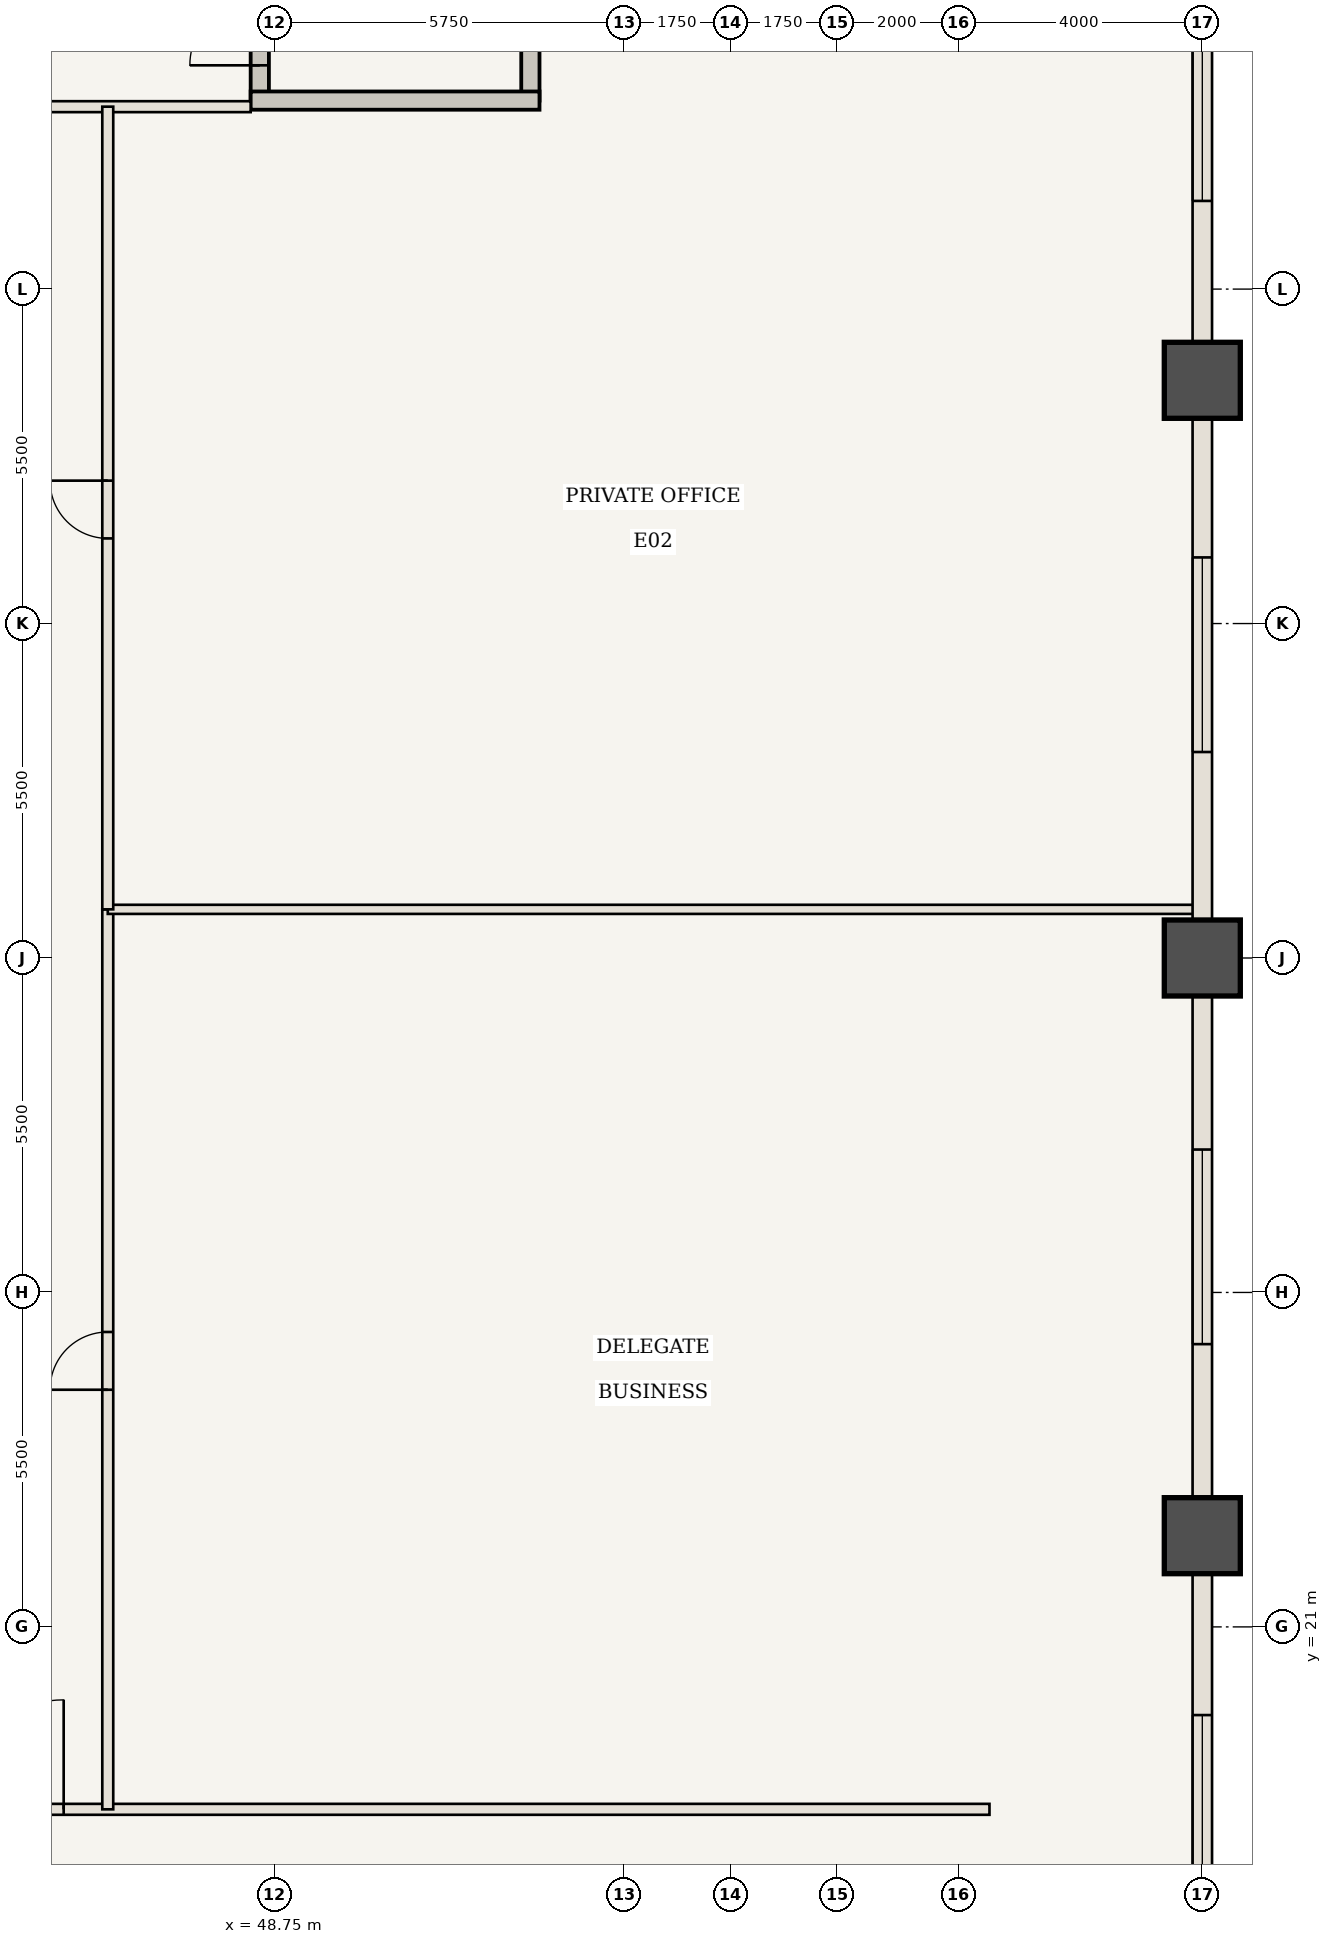
"""IFC4 building model, lengths in metres.
Left out: names, types, materials, properties, quantities, classifications, styles, units other than length and angle.
Written with IfcOpenShell. Run it as: python <this file> out.ifc"""

import sys

from ifc_helpers import new_model, si_unit, direction, frame, frame_2d, origin, origin_2d, place, context, subcontext, project, spatial, rectangle, extrude, element, fill, save


model = new_model("IFC4")
c1 = context("Model", 3, precision=1e-05, world=origin(), true_north=direction((0.0, 1.0)))
c2 = subcontext(c1, "Body", "Model", "MODEL_VIEW")
j1 = project(units=[si_unit("LENGTHUNIT", "METRE"), si_unit("PLANEANGLEUNIT", "RADIAN")], contexts=[c1])
p1 = place(None, origin())
s1 = spatial("IfcSite", under=j1, at=p1, CompositionType="ELEMENT")
p2 = place(p1, origin())
s2 = spatial("IfcBuilding", under=s1, at=p2, CompositionType="ELEMENT")
p3 = place(p2, frame((0.0, 0.0, 29.4)))
s3 = spatial("IfcBuildingStorey", under=s2, at=p3, CompositionType="ELEMENT", Elevation=29.4)
for number, where, z_axis, x_axis in (
    (1, (64.0, 22.5, 0.0), (0.0, 0.0, 1.0), (1.0, 0.0, 0.0)),
    (2, (64.0, 32.0, 0.0), (0.0, 0.0, 1.0), (1.0, 0.0, 0.0)),
    (3, (64.0, 41.5, 0.0), (0.0, 0.0, 1.0), (1.0, 0.0, 0.0)),
):
    element("IfcColumn", number, at=place(p3, frame(where, z_axis=z_axis, x_axis=x_axis)), inside=s3, PredefinedType="COLUMN", context=c2, shape_type="SweptSolid", body=[
        extrude(rectangle(XDim=1.25, YDim=1.25, at=origin_2d()), origin(), (0.0, 0.0, 1.0), 4.48),
    ])
p4 = place(p3, frame((48.5, 46.1, 0.0), z_axis=(0.0, 0.0, 1.0), x_axis=(0.0, 1.0, 0.0)))
e4 = element("IfcWall", 4, at=p4, inside=s3, PredefinedType="SHEAR", context=c2, shape_type="SweptSolid", body=[
    extrude(rectangle(XDim=10.5, YDim=0.3, at=frame_2d((5.25, 0.0))), origin(), (0.0, 0.0, 1.0), 4.48),
])
p5 = place(p4, frame((0.58, 0.0, 0.0)))
e5 = element("IfcOpeningElement", 5, at=p5, cuts=e4, PredefinedType="OPENING", context=c2, shape_type="SweptSolid", body=[
    extrude(rectangle(XDim=1.15, YDim=2.15, at=frame_2d((0.575, 1.075))), frame((0.0, 0.16, 0.0), z_axis=(0.0, -1.0, 0.0), x_axis=(1.0, 0.0, 0.0)), (0.0, 0.0, 1.0), 0.32),
])
p6 = place(p3, frame((52.95, 46.1, 0.0), z_axis=(0.0, 0.0, 1.0), x_axis=(0.0, 1.0, 0.0)))
e6 = element("IfcWall", 6, at=p6, inside=s3, PredefinedType="SHEAR", context=c2, shape_type="SweptSolid", body=[
    extrude(rectangle(XDim=10.5, YDim=0.3, at=frame_2d((5.25, 0.0))), origin(), (0.0, 0.0, 1.0), 4.48),
])
p7 = place(p3, frame((48.35, 46.1, 0.0), z_axis=(0.0, 0.0, 1.0), x_axis=(1.0, 0.0, 0.0)))
e7 = element("IfcWall", 7, at=p7, inside=s3, PredefinedType="SHEAR", context=c2, shape_type="SweptSolid", body=[
    extrude(rectangle(XDim=4.75, YDim=0.3, at=frame_2d((2.375, 0.0))), origin(), (0.0, 0.0, 1.0), 4.48),
])
p8 = place(p3, frame((42.0, 18.0, 0.0), z_axis=(0.0, 0.0, 1.0), x_axis=(1.0, 0.0, 0.0)))
e8 = element("IfcWall", 8, at=p8, inside=s3, PredefinedType="STANDARD", context=c2, shape_type="SweptSolid", body=[
    extrude(rectangle(XDim=18.5, YDim=0.18, at=frame_2d((9.25, 0.0))), origin(), (0.0, 0.0, 1.0), 4.48),
])
p9 = place(p8, frame((1.475, 0.0, 0.0)))
e9 = element("IfcOpeningElement", 9, at=p9, cuts=e8, PredefinedType="OPENING", context=c2, shape_type="SweptSolid", body=[
    extrude(rectangle(XDim=1.8, YDim=2.35, at=frame_2d((0.9, 1.175))), frame((0.0, 0.1, 0.0), z_axis=(0.0, -1.0, 0.0), x_axis=(1.0, 0.0, 0.0)), (0.0, 0.0, 1.0), 0.2),
])
p10 = place(p3, frame((34.5, 46.0, 0.0), z_axis=(0.0, 0.0, 1.0), x_axis=(1.0, 0.0, 0.0)))
e10 = element("IfcWall", 10, at=p10, inside=s3, PredefinedType="STANDARD", context=c2, shape_type="SweptSolid", body=[
    extrude(rectangle(XDim=13.85, YDim=0.18, at=frame_2d((6.925, 0.0))), origin(), (0.0, 0.0, 1.0), 4.48),
])
p11 = place(p10, frame((5.225, 0.0, 0.0)))
e11 = element("IfcOpeningElement", 11, at=p11, cuts=e10, PredefinedType="OPENING", context=c2, shape_type="SweptSolid", body=[
    extrude(rectangle(XDim=0.95, YDim=2.15, at=frame_2d((0.475, 1.075))), frame((0.0, 0.1, 0.0), z_axis=(0.0, -1.0, 0.0), x_axis=(1.0, 0.0, 0.0)), (0.0, 0.0, 1.0), 0.2),
])
p12 = place(p3, frame((46.0, 18.0, 0.0), z_axis=(0.0, 0.0, 1.0), x_axis=(0.0, 1.0, 0.0)))
e12 = element("IfcWall", 12, at=p12, inside=s3, PredefinedType="STANDARD", context=c2, shape_type="SweptSolid", body=[
    extrude(rectangle(XDim=14.8, YDim=0.18, at=frame_2d((7.4, 0.0))), origin(), (0.0, 0.0, 1.0), 4.48),
])
p13 = place(p12, frame((6.9, 0.0, 0.0)))
e13 = element("IfcOpeningElement", 13, at=p13, cuts=e12, PredefinedType="OPENING", context=c2, shape_type="SweptSolid", body=[
    extrude(rectangle(XDim=0.95, YDim=2.15, at=frame_2d((0.475, 1.075))), frame((0.0, 0.1, 0.0), z_axis=(0.0, -1.0, 0.0), x_axis=(1.0, 0.0, 0.0)), (0.0, 0.0, 1.0), 0.2),
])
p14 = place(p3, frame((46.0, 32.8, 0.0), z_axis=(0.0, 0.0, 1.0), x_axis=(1.0, 0.0, 0.0)))
e14 = element("IfcWall", 14, at=p14, inside=s3, PredefinedType="STANDARD", context=c2, shape_type="SweptSolid", body=[
    extrude(rectangle(XDim=17.94, YDim=0.15, at=frame_2d((8.97, 0.0))), origin(), (0.0, 0.0, 1.0), 2.508),
])
p15 = place(p3, frame((46.0, 32.8, 0.0), z_axis=(0.0, 0.0, 1.0), x_axis=(0.0, 1.0, 0.0)))
e15 = element("IfcWall", 15, at=p15, inside=s3, PredefinedType="STANDARD", context=c2, shape_type="SweptSolid", body=[
    extrude(rectangle(XDim=13.2, YDim=0.18, at=frame_2d((6.6, 0.0))), origin(), (0.0, 0.0, 1.0), 4.48),
])
p16 = place(p15, frame((6.1, 0.0, 0.0)))
e16 = element("IfcOpeningElement", 16, at=p16, cuts=e15, PredefinedType="OPENING", context=c2, shape_type="SweptSolid", body=[
    extrude(rectangle(XDim=0.95, YDim=2.15, at=frame_2d((0.475, 1.075))), frame((0.0, 0.1, 0.0), z_axis=(0.0, -1.0, 0.0), x_axis=(1.0, 0.0, 0.0)), (0.0, 0.0, 1.0), 0.2),
])
p17 = place(p3, frame((64.0, 22.5, 0.0), z_axis=(0.0, 0.0, 1.0), x_axis=(0.0, -1.0, 0.0)))
e17 = element("IfcWall", 17, at=p17, inside=s3, PredefinedType="USERDEFINED", context=c2, shape_type="SweptSolid", body=[
    extrude(rectangle(XDim=9.5, YDim=0.32, at=frame_2d((4.75, 0.0))), origin(), (0.0, 0.0, 1.0), 2.48),
])
p18 = place(p17, frame((2.95, 0.0, 0.85)))
e18 = element("IfcOpeningElement", 18, at=p18, cuts=e17, PredefinedType="OPENING", context=c2, shape_type="SweptSolid", body=[
    extrude(rectangle(XDim=3.6, YDim=1.43, at=frame_2d((1.8, 0.715))), frame((0.0, 0.17, 0.0), z_axis=(0.0, -1.0, 0.0), x_axis=(1.0, 0.0, 0.0)), (0.0, 0.0, 1.0), 0.34),
])
p19 = place(p3, frame((64.0, 32.0, 0.0), z_axis=(0.0, 0.0, 1.0), x_axis=(0.0, -1.0, 0.0)))
e19 = element("IfcWall", 19, at=p19, inside=s3, PredefinedType="USERDEFINED", context=c2, shape_type="SweptSolid", body=[
    extrude(rectangle(XDim=9.5, YDim=0.32, at=frame_2d((4.75, 0.0))), origin(), (0.0, 0.0, 1.0), 2.48),
])
p20 = place(p19, frame((3.15, 0.0, 0.85)))
e20 = element("IfcOpeningElement", 20, at=p20, cuts=e19, PredefinedType="OPENING", context=c2, shape_type="SweptSolid", body=[
    extrude(rectangle(XDim=3.2, YDim=1.43, at=frame_2d((1.6, 0.715))), frame((0.0, 0.17, 0.0), z_axis=(0.0, -1.0, 0.0), x_axis=(1.0, 0.0, 0.0)), (0.0, 0.0, 1.0), 0.34),
])
p21 = place(p3, frame((64.0, 41.5, 0.0), z_axis=(0.0, 0.0, 1.0), x_axis=(0.0, -1.0, 0.0)))
e21 = element("IfcWall", 21, at=p21, inside=s3, PredefinedType="USERDEFINED", context=c2, shape_type="SweptSolid", body=[
    extrude(rectangle(XDim=9.5, YDim=0.32, at=frame_2d((4.75, 0.0))), origin(), (0.0, 0.0, 1.0), 2.48),
])
p22 = place(p21, frame((2.913, 0.0, 0.85)))
e22 = element("IfcOpeningElement", 22, at=p22, cuts=e21, PredefinedType="OPENING", context=c2, shape_type="SweptSolid", body=[
    extrude(rectangle(XDim=3.2, YDim=1.43, at=frame_2d((1.6, 0.715))), frame((0.0, 0.17, 0.0), z_axis=(0.0, -1.0, 0.0), x_axis=(1.0, 0.0, 0.0)), (0.0, 0.0, 1.0), 0.34),
])
p23 = place(p3, frame((64.0, 51.0, 0.0), z_axis=(0.0, 0.0, 1.0), x_axis=(0.0, -1.0, 0.0)))
e23 = element("IfcWall", 23, at=p23, inside=s3, PredefinedType="USERDEFINED", context=c2, shape_type="SweptSolid", body=[
    extrude(rectangle(XDim=9.5, YDim=0.32, at=frame_2d((4.75, 0.0))), origin(), (0.0, 0.0, 1.0), 2.48),
])
p24 = place(p23, frame((2.95, 0.0, 0.85)))
e24 = element("IfcOpeningElement", 24, at=p24, cuts=e23, PredefinedType="OPENING", context=c2, shape_type="SweptSolid", body=[
    extrude(rectangle(XDim=3.6, YDim=1.43, at=frame_2d((1.8, 0.715))), frame((0.0, 0.17, 0.0), z_axis=(0.0, -1.0, 0.0), x_axis=(1.0, 0.0, 0.0)), (0.0, 0.0, 1.0), 0.34),
])
p25 = place(p5, origin())
e25 = element("IfcDoor", 25, at=p25, inside=s3, OperationType="SINGLE_SWING_LEFT", PredefinedType="DOOR", context=c2, shape_type="SweptSolid", body=[
    extrude(rectangle(XDim=1.15, YDim=2.15, at=frame_2d((0.575, 1.075))), frame((0.0, 0.025, 0.0), z_axis=(0.0, -1.0, 0.0), x_axis=(1.0, 0.0, 0.0)), (0.0, 0.0, 1.0), 0.05),
])
fill(e5, e25)
p26 = place(p9, origin())
e26 = element("IfcDoor", 26, at=p26, inside=s3, OperationType="SINGLE_SWING_RIGHT", PredefinedType="DOOR", context=c2, shape_type="SweptSolid", body=[
    extrude(rectangle(XDim=1.8, YDim=2.35, at=frame_2d((0.9, 1.175))), frame((0.0, 0.025, 0.0), z_axis=(0.0, -1.0, 0.0), x_axis=(1.0, 0.0, 0.0)), (0.0, 0.0, 1.0), 0.05),
])
fill(e9, e26)
p27 = place(p13, origin())
e27 = element("IfcDoor", 27, at=p27, inside=s3, OperationType="SINGLE_SWING_LEFT", PredefinedType="DOOR", context=c2, shape_type="SweptSolid", body=[
    extrude(rectangle(XDim=0.95, YDim=2.15, at=frame_2d((0.475, 1.075))), frame((0.0, 0.025, 0.0), z_axis=(0.0, -1.0, 0.0), x_axis=(1.0, 0.0, 0.0)), (0.0, 0.0, 1.0), 0.05),
])
fill(e13, e27)
p28 = place(p16, origin())
e28 = element("IfcDoor", 28, at=p28, inside=s3, OperationType="SINGLE_SWING_RIGHT", PredefinedType="DOOR", context=c2, shape_type="SweptSolid", body=[
    extrude(rectangle(XDim=0.95, YDim=2.15, at=frame_2d((0.475, 1.075))), frame((0.0, 0.025, 0.0), z_axis=(0.0, -1.0, 0.0), x_axis=(1.0, 0.0, 0.0)), (0.0, 0.0, 1.0), 0.05),
])
fill(e16, e28)
p29 = place(p18, origin())
e29 = element("IfcWindow", 29, at=p29, inside=s3, PartitioningType="SINGLE_PANEL", PredefinedType="WINDOW", context=c2, shape_type="SweptSolid", body=[
    extrude(rectangle(XDim=3.6, YDim=1.43, at=frame_2d((1.8, 0.715))), frame((0.0, 0.03, 0.0), z_axis=(0.0, -1.0, 0.0), x_axis=(1.0, 0.0, 0.0)), (0.0, 0.0, 1.0), 0.06),
])
fill(e18, e29)
p30 = place(p20, origin())
e30 = element("IfcWindow", 30, at=p30, inside=s3, PartitioningType="SINGLE_PANEL", PredefinedType="WINDOW", context=c2, shape_type="SweptSolid", body=[
    extrude(rectangle(XDim=3.2, YDim=1.43, at=frame_2d((1.6, 0.715))), frame((0.0, 0.03, 0.0), z_axis=(0.0, -1.0, 0.0), x_axis=(1.0, 0.0, 0.0)), (0.0, 0.0, 1.0), 0.06),
])
fill(e20, e30)
p31 = place(p22, origin())
e31 = element("IfcWindow", 31, at=p31, inside=s3, PartitioningType="SINGLE_PANEL", PredefinedType="WINDOW", context=c2, shape_type="SweptSolid", body=[
    extrude(rectangle(XDim=3.2, YDim=1.43, at=frame_2d((1.6, 0.715))), frame((0.0, 0.03, 0.0), z_axis=(0.0, -1.0, 0.0), x_axis=(1.0, 0.0, 0.0)), (0.0, 0.0, 1.0), 0.06),
])
fill(e22, e31)
p32 = place(p24, origin())
e32 = element("IfcWindow", 32, at=p32, inside=s3, PartitioningType="SINGLE_PANEL", PredefinedType="WINDOW", context=c2, shape_type="SweptSolid", body=[
    extrude(rectangle(XDim=3.6, YDim=1.43, at=frame_2d((1.8, 0.715))), frame((0.0, 0.03, 0.0), z_axis=(0.0, -1.0, 0.0), x_axis=(1.0, 0.0, 0.0)), (0.0, 0.0, 1.0), 0.06),
])
fill(e24, e32)
save(model, sys.argv[1])
